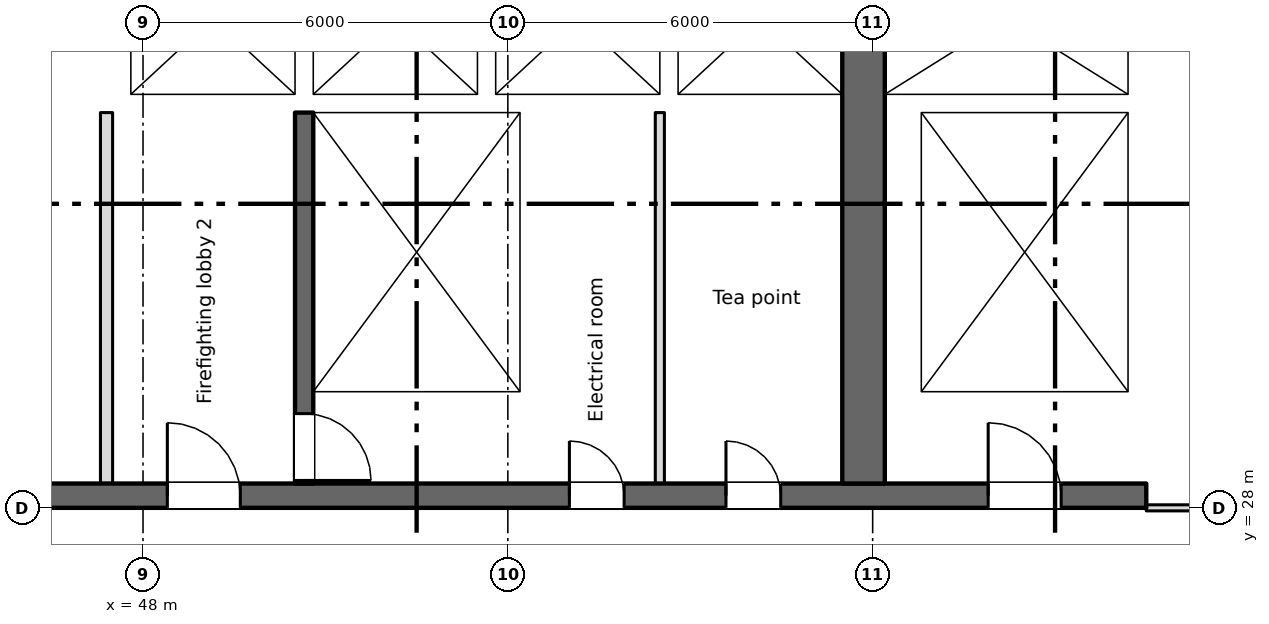
"""IFC4 building model, lengths in metres.
Left out: names, types, materials, properties, quantities, classifications, styles, units other than length and angle.
Written with IfcOpenShell. Run it as: python <this file> out.ifc"""

import sys

from ifc_helpers import new_model, si_unit, direction, frame, frame_2d, origin, place, context, subcontext, project, spatial, rectangle, extrude, element, fill, save


model = new_model("IFC4")
c1 = context("Model", 3, precision=1e-05, world=origin(), true_north=direction((0.0, 1.0)))
c2 = subcontext(c1, "Body", "Model", "MODEL_VIEW")
j1 = project(units=[si_unit("LENGTHUNIT", "METRE"), si_unit("PLANEANGLEUNIT", "RADIAN")], contexts=[c1])
p1 = place(None, origin())
s1 = spatial("IfcSite", under=j1, at=p1, CompositionType="ELEMENT")
p2 = place(p1, origin())
s2 = spatial("IfcBuilding", under=s1, at=p2, CompositionType="ELEMENT")
p3 = place(p2, frame((0.0, 0.0, 181.75)))
s3 = spatial("IfcBuildingStorey", under=s2, at=p3, CompositionType="ELEMENT", Elevation=181.75)
p4 = place(p3, frame((6.6, 28.2, 0.0), z_axis=(0.0, 0.0, 1.0), x_axis=(1.0, 0.0, 0.0)))
e1 = element("IfcWall", 1, at=p4, inside=s3, PredefinedType="SHEAR", context=c2, shape_type="SweptSolid", body=[
    extrude(rectangle(XDim=57.9, YDim=0.4, at=frame_2d((28.95, 0.0))), origin(), (0.0, 0.0, 1.0), 3.35),
])
p5 = place(p4, frame((12.913, 0.0, 0.0)))
e2 = element("IfcOpeningElement", 2, at=p5, cuts=e1, PredefinedType="OPENING", context=c2, shape_type="SweptSolid", body=[
    extrude(rectangle(XDim=0.9, YDim=2.1, at=frame_2d((0.45, 1.05))), frame((0.0, 0.21, 0.0), z_axis=(0.0, -1.0, 0.0), x_axis=(1.0, 0.0, 0.0)), (0.0, 0.0, 1.0), 0.42),
])
p6 = place(p4, frame((15.488, 0.0, 0.0)))
e3 = element("IfcOpeningElement", 3, at=p6, cuts=e1, PredefinedType="OPENING", context=c2, shape_type="SweptSolid", body=[
    extrude(rectangle(XDim=0.9, YDim=2.1, at=frame_2d((0.45, 1.05))), frame((0.0, 0.21, 0.0), z_axis=(0.0, -1.0, 0.0), x_axis=(1.0, 0.0, 0.0)), (0.0, 0.0, 1.0), 0.42),
])
p7 = place(p4, frame((48.413, 0.0, 0.0)))
e4 = element("IfcOpeningElement", 4, at=p7, cuts=e1, PredefinedType="OPENING", context=c2, shape_type="SweptSolid", body=[
    extrude(rectangle(XDim=0.9, YDim=2.1, at=frame_2d((0.45, 1.05))), frame((0.0, 0.21, 0.0), z_axis=(0.0, -1.0, 0.0), x_axis=(1.0, 0.0, 0.0)), (0.0, 0.0, 1.0), 0.42),
])
p8 = place(p4, frame((50.988, 0.0, 0.0)))
e5 = element("IfcOpeningElement", 5, at=p8, cuts=e1, PredefinedType="OPENING", context=c2, shape_type="SweptSolid", body=[
    extrude(rectangle(XDim=0.9, YDim=2.1, at=frame_2d((0.45, 1.05))), frame((0.0, 0.21, 0.0), z_axis=(0.0, -1.0, 0.0), x_axis=(1.0, 0.0, 0.0)), (0.0, 0.0, 1.0), 0.42),
])
p9 = place(p4, frame((0.663, 0.0, 0.0)))
e6 = element("IfcOpeningElement", 6, at=p9, cuts=e1, PredefinedType="OPENING", context=c2, shape_type="SweptSolid", body=[
    extrude(rectangle(XDim=0.9, YDim=2.1, at=frame_2d((0.45, 1.05))), frame((0.0, 0.21, 0.0), z_axis=(0.0, -1.0, 0.0), x_axis=(1.0, 0.0, 0.0)), (0.0, 0.0, 1.0), 0.42),
])
p10 = place(p4, frame((2.238, 0.0, 0.0)))
e7 = element("IfcOpeningElement", 7, at=p10, cuts=e1, PredefinedType="OPENING", context=c2, shape_type="SweptSolid", body=[
    extrude(rectangle(XDim=0.9, YDim=2.1, at=frame_2d((0.45, 1.05))), frame((0.0, 0.21, 0.0), z_axis=(0.0, -1.0, 0.0), x_axis=(1.0, 0.0, 0.0)), (0.0, 0.0, 1.0), 0.42),
])
p11 = place(p4, frame((4.8, 0.0, 0.0)))
e8 = element("IfcOpeningElement", 8, at=p11, cuts=e1, PredefinedType="OPENING", context=c2, shape_type="SweptSolid", body=[
    extrude(rectangle(XDim=1.2, YDim=2.1, at=frame_2d((0.6, 1.05))), frame((0.0, 0.21, 0.0), z_axis=(0.0, -1.0, 0.0), x_axis=(1.0, 0.0, 0.0)), (0.0, 0.0, 1.0), 0.42),
])
p12 = place(p4, frame((31.8, 0.0, 0.0)))
e9 = element("IfcOpeningElement", 9, at=p12, cuts=e1, PredefinedType="OPENING", context=c2, shape_type="SweptSolid", body=[
    extrude(rectangle(XDim=1.2, YDim=2.1, at=frame_2d((0.6, 1.05))), frame((0.0, 0.21, 0.0), z_axis=(0.0, -1.0, 0.0), x_axis=(1.0, 0.0, 0.0)), (0.0, 0.0, 1.0), 0.42),
])
p13 = place(p4, frame((55.3, 0.0, 0.0)))
e10 = element("IfcOpeningElement", 10, at=p13, cuts=e1, PredefinedType="OPENING", context=c2, shape_type="SweptSolid", body=[
    extrude(rectangle(XDim=1.2, YDim=2.1, at=frame_2d((0.6, 1.05))), frame((0.0, 0.21, 0.0), z_axis=(0.0, -1.0, 0.0), x_axis=(1.0, 0.0, 0.0)), (0.0, 0.0, 1.0), 0.42),
])
p14 = place(p4, frame((21.8, 0.0, 0.0)))
e11 = element("IfcOpeningElement", 11, at=p14, cuts=e1, PredefinedType="OPENING", context=c2, shape_type="SweptSolid", body=[
    extrude(rectangle(XDim=1.2, YDim=2.1, at=frame_2d((0.6, 1.05))), frame((0.0, 0.21, 0.0), z_axis=(0.0, -1.0, 0.0), x_axis=(1.0, 0.0, 0.0)), (0.0, 0.0, 1.0), 0.42),
])
p15 = place(p4, frame((41.8, 0.0, 0.0)))
e12 = element("IfcOpeningElement", 12, at=p15, cuts=e1, PredefinedType="OPENING", context=c2, shape_type="SweptSolid", body=[
    extrude(rectangle(XDim=1.2, YDim=2.1, at=frame_2d((0.6, 1.05))), frame((0.0, 0.21, 0.0), z_axis=(0.0, -1.0, 0.0), x_axis=(1.0, 0.0, 0.0)), (0.0, 0.0, 1.0), 0.42),
])
p16 = place(p4, frame((24.95, 0.0, 0.0)))
e13 = element("IfcOpeningElement", 13, at=p16, cuts=e1, PredefinedType="OPENING", context=c2, shape_type="SweptSolid", body=[
    extrude(rectangle(XDim=2.4, YDim=2.1, at=frame_2d((1.2, 1.05))), frame((0.0, 0.21, 0.0), z_axis=(0.0, -1.0, 0.0), x_axis=(1.0, 0.0, 0.0)), (0.0, 0.0, 1.0), 0.42),
])
p17 = place(p4, frame((37.45, 0.0, 0.0)))
e14 = element("IfcOpeningElement", 14, at=p17, cuts=e1, PredefinedType="OPENING", context=c2, shape_type="SweptSolid", body=[
    extrude(rectangle(XDim=2.4, YDim=2.1, at=frame_2d((1.2, 1.05))), frame((0.0, 0.21, 0.0), z_axis=(0.0, -1.0, 0.0), x_axis=(1.0, 0.0, 0.0)), (0.0, 0.0, 1.0), 0.42),
])
p18 = place(p4, frame((8.1, 0.0, 0.0)))
e15 = element("IfcOpeningElement", 15, at=p18, cuts=e1, PredefinedType="OPENING", context=c2, shape_type="SweptSolid", body=[
    extrude(rectangle(XDim=2.4, YDim=2.1, at=frame_2d((1.2, 1.05))), frame((0.0, 0.21, 0.0), z_axis=(0.0, -1.0, 0.0), x_axis=(1.0, 0.0, 0.0)), (0.0, 0.0, 1.0), 0.42),
])
p19 = place(p4, frame((28.95, 0.0, 0.0)))
e16 = element("IfcOpeningElement", 16, at=p19, cuts=e1, PredefinedType="OPENING", context=c2, shape_type="SweptSolid", body=[
    extrude(rectangle(XDim=0.9, YDim=2.1, at=frame_2d((0.45, 1.05))), frame((0.0, 0.21, 0.0), z_axis=(0.0, -1.0, 0.0), x_axis=(1.0, 0.0, 0.0)), (0.0, 0.0, 1.0), 0.42),
])
p20 = place(p4, frame((34.95, 0.0, 0.0)))
e17 = element("IfcOpeningElement", 17, at=p20, cuts=e1, PredefinedType="OPENING", context=c2, shape_type="SweptSolid", body=[
    extrude(rectangle(XDim=0.9, YDim=2.1, at=frame_2d((0.45, 1.05))), frame((0.0, 0.21, 0.0), z_axis=(0.0, -1.0, 0.0), x_axis=(1.0, 0.0, 0.0)), (0.0, 0.0, 1.0), 0.42),
])
p21 = place(p3, frame((64.35, 34.8, 0.0), z_axis=(0.0, 0.0, 1.0), x_axis=(0.0, 1.0, 0.0)))
e18 = element("IfcWall", 18, at=p21, inside=s3, PredefinedType="SHEAR", context=c2, shape_type="SweptSolid", body=[
    extrude(rectangle(XDim=10.5, YDim=0.3, at=frame_2d((5.25, 0.0))), origin(), (0.0, 0.0, 1.0), 3.35),
])
p22 = place(p3, frame((59.85, 28.4, 0.0), z_axis=(0.0, 0.0, 1.0), x_axis=(0.0, 1.0, 0.0)))
e19 = element("IfcWall", 19, at=p22, inside=s3, PredefinedType="SHEAR", context=c2, shape_type="SweptSolid", body=[
    extrude(rectangle(XDim=16.9, YDim=0.7, at=frame_2d((8.45, 0.0))), origin(), (0.0, 0.0, 1.0), 3.35),
])
p23 = place(p22, frame((9.6, 0.0, 0.0)))
e20 = element("IfcOpeningElement", 20, at=p23, cuts=e19, PredefinedType="OPENING", context=c2, shape_type="SweptSolid", body=[
    extrude(rectangle(XDim=2.0, YDim=2.1, at=frame_2d((1.0, 1.05))), frame((0.0, 0.36, 0.0), z_axis=(0.0, -1.0, 0.0), x_axis=(1.0, 0.0, 0.0)), (0.0, 0.0, 1.0), 0.72),
])
p24 = place(p22, frame((15.4, 0.0, 0.0)))
e21 = element("IfcOpeningElement", 21, at=p24, cuts=e19, PredefinedType="OPENING", context=c2, shape_type="SweptSolid", body=[
    extrude(rectangle(XDim=1.2, YDim=2.1, at=frame_2d((0.6, 1.05))), frame((0.0, 0.36, 0.0), z_axis=(0.0, -1.0, 0.0), x_axis=(1.0, 0.0, 0.0)), (0.0, 0.0, 1.0), 0.72),
])
p25 = place(p3, frame((50.65, 34.5, 0.0), z_axis=(0.0, 0.0, 1.0), x_axis=(0.0, -1.0, 0.0)))
e22 = element("IfcWall", 22, at=p25, inside=s3, PredefinedType="SHEAR", context=c2, shape_type="SweptSolid", body=[
    extrude(rectangle(XDim=6.1, YDim=0.3, at=frame_2d((3.05, 0.0))), origin(), (0.0, 0.0, 1.0), 3.35),
])
p26 = place(p25, frame((4.95, 0.0, 0.0)))
e23 = element("IfcOpeningElement", 23, at=p26, cuts=e22, PredefinedType="OPENING", context=c2, shape_type="SweptSolid", body=[
    extrude(rectangle(XDim=1.1, YDim=2.1, at=frame_2d((0.55, 1.05))), frame((0.0, 0.16, 0.0), z_axis=(0.0, -1.0, 0.0), x_axis=(1.0, 0.0, 0.0)), (0.0, 0.0, 1.0), 0.32),
])
p27 = place(p3, frame((54.35, 28.4, 0.0), z_axis=(0.0, 0.0, 1.0), x_axis=(0.0, 1.0, 0.0)))
e24 = element("IfcWall", 24, at=p27, inside=s3, PredefinedType="SHEAR", context=c2, shape_type="SweptSolid", body=[
    extrude(rectangle(XDim=6.1, YDim=0.3, at=frame_2d((3.05, 0.0))), origin(), (0.0, 0.0, 1.0), 3.35),
])
p28 = place(p3, frame((60.5, 28.4, 0.0), z_axis=(0.0, 0.0, 1.0), x_axis=(0.0, 1.0, 0.0)))
e25 = element("IfcWall", 25, at=p28, inside=s3, PredefinedType="SHEAR", context=c2, shape_type="SweptSolid", body=[
    extrude(rectangle(XDim=6.1, YDim=0.6, at=frame_2d((3.05, 0.0))), origin(), (0.0, 0.0, 1.0), 3.35),
])
p29 = place(p3, frame((64.35, 28.4, 0.0), z_axis=(0.0, 0.0, 1.0), x_axis=(0.0, 1.0, 0.0)))
e26 = element("IfcWall", 26, at=p29, inside=s3, PredefinedType="SHEAR", context=c2, shape_type="SweptSolid", body=[
    extrude(rectangle(XDim=6.1, YDim=0.3, at=frame_2d((3.05, 0.0))), origin(), (0.0, 0.0, 1.0), 3.35),
])
p30 = place(p3, frame((47.3, 34.65, 0.0), z_axis=(0.0, 0.0, 1.0), x_axis=(1.0, 0.0, 0.0)))
e27 = element("IfcWall", 27, at=p30, inside=s3, PredefinedType="SHEAR", context=c2, shape_type="SweptSolid", body=[
    extrude(rectangle(XDim=12.2, YDim=0.3, at=frame_2d((6.1, 0.0))), origin(), (0.0, 0.0, 1.0), 3.35),
])
p31 = place(p30, frame((1.3, 0.0, 0.0)))
e28 = element("IfcOpeningElement", 28, at=p31, cuts=e27, PredefinedType="OPENING", context=c2, shape_type="SweptSolid", body=[
    extrude(rectangle(XDim=1.1, YDim=2.1, at=frame_2d((0.55, 1.05))), frame((0.0, 0.16, 0.0), z_axis=(0.0, -1.0, 0.0), x_axis=(1.0, 0.0, 0.0)), (0.0, 0.0, 1.0), 0.32),
])
p32 = place(p3, frame((60.2, 34.65, 0.0), z_axis=(0.0, 0.0, 1.0), x_axis=(1.0, 0.0, 0.0)))
e29 = element("IfcWall", 29, at=p32, inside=s3, PredefinedType="SHEAR", context=c2, shape_type="SweptSolid", body=[
    extrude(rectangle(XDim=4.3, YDim=0.3, at=frame_2d((2.15, 0.0))), origin(), (0.0, 0.0, 1.0), 3.35),
])
p33 = place(p3, frame((47.55, 34.8, 0.0), z_axis=(0.0, 0.0, 1.0), x_axis=(0.0, 1.0, 0.0)))
e30 = element("IfcWall", 30, at=p33, inside=s3, PredefinedType="SHEAR", context=c2, shape_type="SweptSolid", body=[
    extrude(rectangle(XDim=2.5, YDim=0.5, at=frame_2d((1.25, 0.0))), origin(), (0.0, 0.0, 1.0), 3.35),
])
for number, where, z_axis, x_axis in (
    (31, (50.65, 34.8, 0.0), (0.0, 0.0, 1.0), (0.0, 1.0, 0.0)),
    (32, (53.65, 34.8, 0.0), (0.0, 0.0, 1.0), (0.0, 1.0, 0.0)),
    (33, (56.65, 34.8, 0.0), (0.0, 0.0, 1.0), (0.0, 1.0, 0.0)),
):
    element("IfcWall", number, at=place(p3, frame(where, z_axis=z_axis, x_axis=x_axis)), inside=s3, PredefinedType="SHEAR", context=c2, shape_type="SweptSolid", body=[
        extrude(rectangle(XDim=2.5, YDim=0.3, at=frame_2d((1.25, 0.0))), origin(), (0.0, 0.0, 1.0), 3.35),
    ])
p34 = place(p3, frame((47.4, 28.4, 0.0), z_axis=(0.0, 0.0, 1.0), x_axis=(0.0, 1.0, 0.0)))
e34 = element("IfcWall", 34, at=p34, inside=s3, PredefinedType="PARTITIONING", context=c2, shape_type="SweptSolid", body=[
    extrude(rectangle(XDim=6.1, YDim=0.2, at=frame_2d((3.05, 0.0))), origin(), (0.0, 0.0, 1.0), 3.35),
])
p35 = place(p3, frame((56.5, 28.4, 0.0), z_axis=(0.0, 0.0, 1.0), x_axis=(0.0, 1.0, 0.0)))
e35 = element("IfcWall", 35, at=p35, inside=s3, PredefinedType="PARTITIONING", context=c2, shape_type="SweptSolid", body=[
    extrude(rectangle(XDim=6.1, YDim=0.15, at=frame_2d((3.05, 0.0))), origin(), (0.0, 0.0, 1.0), 3.35),
])
p36 = place(p3, frame((64.5, 28.0, 0.0), z_axis=(0.0, 0.0, 1.0), x_axis=(1.0, 0.0, 0.0)))
e36 = element("IfcWall", 36, at=p36, inside=s3, PredefinedType="PARTITIONING", context=c2, shape_type="SweptSolid", body=[
    extrude(rectangle(XDim=6.9, YDim=0.1, at=frame_2d((3.45, 0.0))), origin(), (0.0, 0.0, 1.0), 3.35),
])
p37 = place(p36, frame((2.95, 0.0, 0.0)))
e37 = element("IfcOpeningElement", 37, at=p37, cuts=e36, PredefinedType="OPENING", context=c2, shape_type="SweptSolid", body=[
    extrude(rectangle(XDim=1.0, YDim=2.1, at=frame_2d((0.5, 1.05))), frame((0.0, 0.06, 0.0), z_axis=(0.0, -1.0, 0.0), x_axis=(1.0, 0.0, 0.0)), (0.0, 0.0, 1.0), 0.12),
])
p38 = place(p7, origin())
e38 = element("IfcDoor", 38, at=p38, inside=s3, OperationType="SINGLE_SWING_LEFT", PredefinedType="DOOR", context=c2, shape_type="SweptSolid", body=[
    extrude(rectangle(XDim=0.9, YDim=2.1, at=frame_2d((0.45, 1.05))), frame((0.0, 0.025, 0.0), z_axis=(0.0, -1.0, 0.0), x_axis=(1.0, 0.0, 0.0)), (0.0, 0.0, 1.0), 0.05),
])
fill(e4, e38)
p39 = place(p8, origin())
e39 = element("IfcDoor", 39, at=p39, inside=s3, OperationType="SINGLE_SWING_LEFT", PredefinedType="DOOR", context=c2, shape_type="SweptSolid", body=[
    extrude(rectangle(XDim=0.9, YDim=2.1, at=frame_2d((0.45, 1.05))), frame((0.0, 0.025, 0.0), z_axis=(0.0, -1.0, 0.0), x_axis=(1.0, 0.0, 0.0)), (0.0, 0.0, 1.0), 0.05),
])
fill(e5, e39)
p40 = place(p31, origin())
e40 = element("IfcDoor", 40, at=p40, inside=s3, OperationType="SLIDING_TO_LEFT", PredefinedType="DOOR", context=c2, shape_type="SweptSolid", body=[
    extrude(rectangle(XDim=1.1, YDim=2.1, at=frame_2d((0.55, 1.05))), frame((0.0, 0.025, 0.0), z_axis=(0.0, -1.0, 0.0), x_axis=(1.0, 0.0, 0.0)), (0.0, 0.0, 1.0), 0.05),
])
fill(e28, e40)
p41 = place(p26, origin())
e41 = element("IfcDoor", 41, at=p41, inside=s3, OperationType="SINGLE_SWING_RIGHT", PredefinedType="DOOR", context=c2, shape_type="SweptSolid", body=[
    extrude(rectangle(XDim=1.1, YDim=2.1, at=frame_2d((0.55, 1.05))), frame((0.0, 0.025, 0.0), z_axis=(0.0, -1.0, 0.0), x_axis=(1.0, 0.0, 0.0)), (0.0, 0.0, 1.0), 0.05),
])
fill(e23, e41)
p42 = place(p13, origin())
e42 = element("IfcDoor", 42, at=p42, inside=s3, OperationType="SINGLE_SWING_LEFT", PredefinedType="DOOR", context=c2, shape_type="SweptSolid", body=[
    extrude(rectangle(XDim=1.2, YDim=2.1, at=frame_2d((0.6, 1.05))), frame((0.0, 0.025, 0.0), z_axis=(0.0, -1.0, 0.0), x_axis=(1.0, 0.0, 0.0)), (0.0, 0.0, 1.0), 0.05),
])
fill(e10, e42)
p43 = place(p15, origin())
e43 = element("IfcDoor", 43, at=p43, inside=s3, OperationType="SINGLE_SWING_LEFT", PredefinedType="DOOR", context=c2, shape_type="SweptSolid", body=[
    extrude(rectangle(XDim=1.2, YDim=2.1, at=frame_2d((0.6, 1.05))), frame((0.0, 0.025, 0.0), z_axis=(0.0, -1.0, 0.0), x_axis=(1.0, 0.0, 0.0)), (0.0, 0.0, 1.0), 0.05),
])
fill(e12, e43)
save(model, sys.argv[1])
